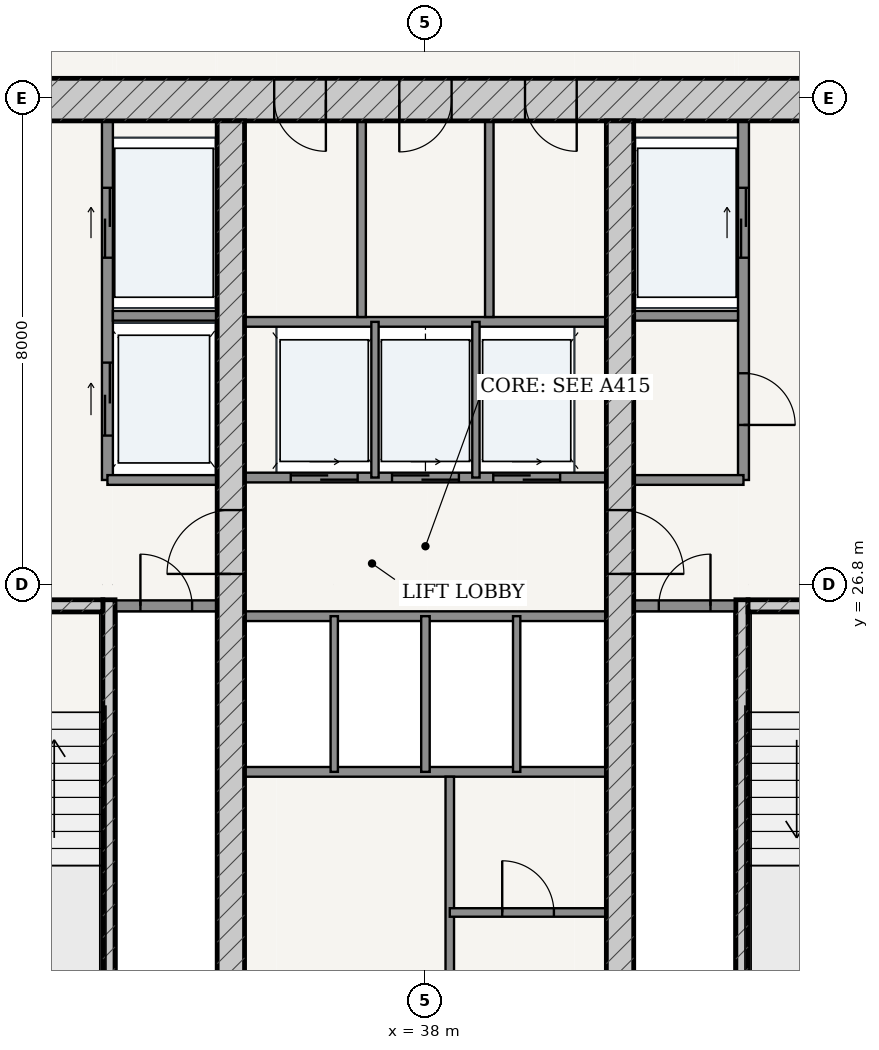
"""IFC4 building model, lengths in metres.
Left out: names, types, materials, properties, quantities, classifications, styles, units other than length and angle.
Written with IfcOpenShell. Run it as: python <this file> out.ifc"""

import sys

from ifc_helpers import new_model, si_unit, direction, frame, frame_2d, origin, place, context, subcontext, project, spatial, rectangle, extrude, source, transform, mapped, element, fill, save


model = new_model("IFC4")
c1 = context("Model", 3, precision=1e-05, world=origin(), true_north=direction((-0.2419218956, 0.970295726276)))
c2 = subcontext(c1, "Body", "Model", "MODEL_VIEW")
j1 = project(units=[si_unit("LENGTHUNIT", "METRE"), si_unit("PLANEANGLEUNIT", "RADIAN")], contexts=[c1])
p1 = place(None, origin())
s1 = spatial("IfcSite", under=j1, at=p1, CompositionType="ELEMENT")
p2 = place(p1, origin())
s2 = spatial("IfcBuilding", under=s1, at=p2, CompositionType="ELEMENT")
p3 = place(p2, frame((0.0, 0.0, 87.0)))
s3 = spatial("IfcBuildingStorey", under=s2, at=p3, CompositionType="ELEMENT", Elevation=87.0)
p4 = place(p3, frame((28.675, 34.775, 0.0), z_axis=(0.0, 0.0, 1.0), x_axis=(1.0, 0.0, 0.0)))
e1 = element("IfcWall", 1, at=p4, inside=s3, PredefinedType="SHEAR", context=c2, shape_type="SweptSolid", body=[
    extrude(rectangle(XDim=18.65, YDim=0.7, at=frame_2d((9.325, 0.0))), origin(), (0.0, 0.0, 1.0), 3.325),
])
p5 = place(p4, frame((6.837, 0.0, 0.0)))
e2 = element("IfcOpeningElement", 2, at=p5, cuts=e1, PredefinedType="OPENING", context=c2, shape_type="SweptSolid", body=[
    extrude(rectangle(XDim=0.85, YDim=2.1, at=frame_2d((0.425, 1.05))), frame((0.0, 0.36, 0.0), z_axis=(0.0, -1.0, 0.0), x_axis=(1.0, 0.0, 0.0)), (0.0, 0.0, 1.0), 0.72),
])
p6 = place(p4, frame((8.895, 0.0, 0.0)))
e3 = element("IfcOpeningElement", 3, at=p6, cuts=e1, PredefinedType="OPENING", context=c2, shape_type="SweptSolid", body=[
    extrude(rectangle(XDim=0.86, YDim=2.1, at=frame_2d((0.43, 1.05))), frame((0.0, 0.36, 0.0), z_axis=(0.0, -1.0, 0.0), x_axis=(1.0, 0.0, 0.0)), (0.0, 0.0, 1.0), 0.72),
])
p7 = place(p4, frame((10.962, 0.0, 0.0)))
e4 = element("IfcOpeningElement", 4, at=p7, cuts=e1, PredefinedType="OPENING", context=c2, shape_type="SweptSolid", body=[
    extrude(rectangle(XDim=0.85, YDim=2.1, at=frame_2d((0.425, 1.05))), frame((0.0, 0.36, 0.0), z_axis=(0.0, -1.0, 0.0), x_axis=(1.0, 0.0, 0.0)), (0.0, 0.0, 1.0), 0.72),
])
p8 = place(p3, frame((32.795, 19.175, 0.0), z_axis=(0.0, 0.0, 1.0), x_axis=(0.0, 1.0, 0.0)))
e5 = element("IfcWall", 5, at=p8, inside=s3, PredefinedType="SOLIDWALL", context=c2, shape_type="SweptSolid", body=[
    extrude(rectangle(XDim=7.375, YDim=0.2, at=frame_2d((3.688, 0.0))), origin(), (0.0, 0.0, 1.0), 3.325),
])
p9 = place(p3, frame((29.375, 26.45, 0.0), z_axis=(0.0, 0.0, 1.0), x_axis=(1.0, 0.0, 0.0)))
e6 = element("IfcWall", 6, at=p9, inside=s3, PredefinedType="SOLIDWALL", context=c2, shape_type="SweptSolid", body=[
    extrude(rectangle(XDim=3.32, YDim=0.2, at=frame_2d((1.66, 0.0))), origin(), (0.0, 0.0, 1.0), 3.325),
])
p10 = place(p9, frame((1.185, 0.0, 0.0)))
e7 = element("IfcOpeningElement", 7, at=p10, cuts=e6, PredefinedType="OPENING", context=c2, shape_type="SweptSolid", body=[
    extrude(rectangle(XDim=0.95, YDim=2.15, at=frame_2d((0.475, 1.075))), frame((0.0, 0.11, 0.0), z_axis=(0.0, -1.0, 0.0), x_axis=(1.0, 0.0, 0.0)), (0.0, 0.0, 1.0), 0.22),
])
p11 = place(p3, frame((43.205, 19.175, 0.0), z_axis=(0.0, 0.0, 1.0), x_axis=(0.0, 1.0, 0.0)))
e8 = element("IfcWall", 8, at=p11, inside=s3, PredefinedType="SOLIDWALL", context=c2, shape_type="SweptSolid", body=[
    extrude(rectangle(XDim=7.375, YDim=0.2, at=frame_2d((3.688, 0.0))), origin(), (0.0, 0.0, 1.0), 3.325),
])
p12 = place(p3, frame((43.305, 26.45, 0.0), z_axis=(0.0, 0.0, 1.0), x_axis=(1.0, 0.0, 0.0)))
e9 = element("IfcWall", 9, at=p12, inside=s3, PredefinedType="SOLIDWALL", context=c2, shape_type="SweptSolid", body=[
    extrude(rectangle(XDim=3.32, YDim=0.2, at=frame_2d((1.66, 0.0))), origin(), (0.0, 0.0, 1.0), 3.325),
])
p13 = place(p12, frame((1.185, 0.0, 0.0)))
e10 = element("IfcOpeningElement", 10, at=p13, cuts=e9, PredefinedType="OPENING", context=c2, shape_type="SweptSolid", body=[
    extrude(rectangle(XDim=0.95, YDim=2.15, at=frame_2d((0.475, 1.075))), frame((0.0, 0.11, 0.0), z_axis=(0.0, -1.0, 0.0), x_axis=(1.0, 0.0, 0.0)), (0.0, 0.0, 1.0), 0.22),
])
p14 = place(p3, frame((34.8, 19.175, 0.0), z_axis=(0.0, 0.0, 1.0), x_axis=(0.0, 1.0, 0.0)))
e11 = element("IfcWall", 11, at=p14, inside=s3, PredefinedType="SHEAR", context=c2, shape_type="SweptSolid", body=[
    extrude(rectangle(XDim=15.25, YDim=0.45, at=frame_2d((7.625, 0.0))), origin(), (0.0, 0.0, 1.0), 3.325),
])
p15 = place(p14, frame((7.8, 0.0, 0.0)))
e12 = element("IfcOpeningElement", 12, at=p15, cuts=e11, PredefinedType="OPENING", context=c2, shape_type="SweptSolid", body=[
    extrude(rectangle(XDim=1.05, YDim=2.15, at=frame_2d((0.525, 1.075))), frame((0.0, 0.235, 0.0), z_axis=(0.0, -1.0, 0.0), x_axis=(1.0, 0.0, 0.0)), (0.0, 0.0, 1.0), 0.47),
])
p16 = place(p3, frame((41.2, 19.175, 0.0), z_axis=(0.0, 0.0, 1.0), x_axis=(0.0, 1.0, 0.0)))
e13 = element("IfcWall", 13, at=p16, inside=s3, PredefinedType="SHEAR", context=c2, shape_type="SweptSolid", body=[
    extrude(rectangle(XDim=15.25, YDim=0.45, at=frame_2d((7.625, 0.0))), origin(), (0.0, 0.0, 1.0), 3.325),
])
p17 = place(p16, frame((7.8, 0.0, 0.0)))
e14 = element("IfcOpeningElement", 14, at=p17, cuts=e13, PredefinedType="OPENING", context=c2, shape_type="SweptSolid", body=[
    extrude(rectangle(XDim=1.05, YDim=2.15, at=frame_2d((0.525, 1.075))), frame((0.0, 0.235, 0.0), z_axis=(0.0, -1.0, 0.0), x_axis=(1.0, 0.0, 0.0)), (0.0, 0.0, 1.0), 0.47),
])
p18 = place(p3, frame((32.9, 26.45, 0.0), z_axis=(0.0, 0.0, 1.0), x_axis=(1.0, 0.0, 0.0)))
e15 = element("IfcWall", 15, at=p18, inside=s3, PredefinedType="PARTITIONING", context=c2, shape_type="SweptSolid", body=[
    extrude(rectangle(XDim=1.675, YDim=0.18, at=frame_2d((0.837, 0.0))), origin(), (0.0, 0.0, 1.0), 3.325),
])
p19 = place(p18, frame((0.413, 0.0, 0.0)))
e16 = element("IfcOpeningElement", 16, at=p19, cuts=e15, PredefinedType="OPENING", context=c2, shape_type="SweptSolid", body=[
    extrude(rectangle(XDim=0.85, YDim=2.1, at=frame_2d((0.425, 1.05))), frame((0.0, 0.1, 0.0), z_axis=(0.0, -1.0, 0.0), x_axis=(1.0, 0.0, 0.0)), (0.0, 0.0, 1.0), 0.2),
])
p20 = place(p3, frame((41.425, 26.45, 0.0), z_axis=(0.0, 0.0, 1.0), x_axis=(1.0, 0.0, 0.0)))
e17 = element("IfcWall", 17, at=p20, inside=s3, PredefinedType="PARTITIONING", context=c2, shape_type="SweptSolid", body=[
    extrude(rectangle(XDim=1.675, YDim=0.18, at=frame_2d((0.837, 0.0))), origin(), (0.0, 0.0, 1.0), 3.325),
])
p21 = place(p20, frame((0.413, 0.0, 0.0)))
e18 = element("IfcOpeningElement", 18, at=p21, cuts=e17, PredefinedType="OPENING", context=c2, shape_type="SweptSolid", body=[
    extrude(rectangle(XDim=0.85, YDim=2.1, at=frame_2d((0.425, 1.05))), frame((0.0, 0.1, 0.0), z_axis=(0.0, -1.0, 0.0), x_axis=(1.0, 0.0, 0.0)), (0.0, 0.0, 1.0), 0.2),
])
p22 = place(p3, frame((32.77, 28.52, 0.0), z_axis=(0.0, 0.0, 1.0), x_axis=(0.0, 1.0, 0.0)))
e19 = element("IfcWall", 19, at=p22, inside=s3, PredefinedType="PARTITIONING", context=c2, shape_type="SweptSolid", body=[
    extrude(rectangle(XDim=5.905, YDim=0.18, at=frame_2d((2.953, 0.0))), origin(), (0.0, 0.0, 1.0), 3.325),
])
p23 = place(p22, frame((3.655, 0.0, 0.0)))
e20 = element("IfcOpeningElement", 20, at=p23, cuts=e19, PredefinedType="OPENING", context=c2, shape_type="SweptSolid", body=[
    extrude(rectangle(XDim=1.15, YDim=2.2, at=frame_2d((0.575, 1.1))), frame((0.0, 0.1, 0.0), z_axis=(0.0, -1.0, 0.0), x_axis=(1.0, 0.0, 0.0)), (0.0, 0.0, 1.0), 0.2),
])
p24 = place(p22, frame((0.73, 0.0, 0.0)))
e21 = element("IfcOpeningElement", 21, at=p24, cuts=e19, PredefinedType="OPENING", context=c2, shape_type="SweptSolid", body=[
    extrude(rectangle(XDim=1.2, YDim=2.25, at=frame_2d((0.6, 1.125))), frame((0.0, 0.1, 0.0), z_axis=(0.0, -1.0, 0.0), x_axis=(1.0, 0.0, 0.0)), (0.0, 0.0, 1.0), 0.2),
])
p25 = place(p3, frame((32.86, 31.22, 0.0), z_axis=(0.0, 0.0, 1.0), x_axis=(1.0, 0.0, 0.0)))
e22 = element("IfcWall", 22, at=p25, inside=s3, PredefinedType="PARTITIONING", context=c2, shape_type="SweptSolid", body=[
    extrude(rectangle(XDim=1.715, YDim=0.16, at=frame_2d((0.857, 0.0))), origin(), (0.0, 0.0, 1.0), 3.325),
])
p26 = place(p3, frame((32.77, 28.52, 0.0), z_axis=(0.0, 0.0, 1.0), x_axis=(1.0, 0.0, 0.0)))
e23 = element("IfcWall", 23, at=p26, inside=s3, PredefinedType="PARTITIONING", context=c2, shape_type="SweptSolid", body=[
    extrude(rectangle(XDim=1.805, YDim=0.16, at=frame_2d((0.902, 0.0))), origin(), (0.0, 0.0, 1.0), 3.325),
])
p27 = place(p3, frame((43.23, 28.52, 0.0), z_axis=(0.0, 0.0, 1.0), x_axis=(0.0, 1.0, 0.0)))
e24 = element("IfcWall", 24, at=p27, inside=s3, PredefinedType="PARTITIONING", context=c2, shape_type="SweptSolid", body=[
    extrude(rectangle(XDim=5.905, YDim=0.18, at=frame_2d((2.953, 0.0))), origin(), (0.0, 0.0, 1.0), 3.325),
])
p28 = place(p27, frame((0.905, 0.0, 0.0)))
e25 = element("IfcOpeningElement", 25, at=p28, cuts=e24, PredefinedType="OPENING", context=c2, shape_type="SweptSolid", body=[
    extrude(rectangle(XDim=0.85, YDim=2.1, at=frame_2d((0.425, 1.05))), frame((0.0, 0.1, 0.0), z_axis=(0.0, -1.0, 0.0), x_axis=(1.0, 0.0, 0.0)), (0.0, 0.0, 1.0), 0.2),
])
p29 = place(p27, frame((3.655, 0.0, 0.0)))
e26 = element("IfcOpeningElement", 26, at=p29, cuts=e24, PredefinedType="OPENING", context=c2, shape_type="SweptSolid", body=[
    extrude(rectangle(XDim=1.15, YDim=2.2, at=frame_2d((0.575, 1.1))), frame((0.0, 0.1, 0.0), z_axis=(0.0, -1.0, 0.0), x_axis=(1.0, 0.0, 0.0)), (0.0, 0.0, 1.0), 0.2),
])
p30 = place(p3, frame((41.425, 31.22, 0.0), z_axis=(0.0, 0.0, 1.0), x_axis=(1.0, 0.0, 0.0)))
e27 = element("IfcWall", 27, at=p30, inside=s3, PredefinedType="PARTITIONING", context=c2, shape_type="SweptSolid", body=[
    extrude(rectangle(XDim=1.715, YDim=0.16, at=frame_2d((0.857, 0.0))), origin(), (0.0, 0.0, 1.0), 3.325),
])
p31 = place(p3, frame((41.425, 28.52, 0.0), z_axis=(0.0, 0.0, 1.0), x_axis=(1.0, 0.0, 0.0)))
e28 = element("IfcWall", 28, at=p31, inside=s3, PredefinedType="PARTITIONING", context=c2, shape_type="SweptSolid", body=[
    extrude(rectangle(XDim=1.805, YDim=0.16, at=frame_2d((0.902, 0.0))), origin(), (0.0, 0.0, 1.0), 3.325),
])
p32 = place(p3, frame((35.025, 28.56, 0.0), z_axis=(0.0, 0.0, 1.0), x_axis=(1.0, 0.0, 0.0)))
e29 = element("IfcWall", 29, at=p32, inside=s3, PredefinedType="PARTITIONING", context=c2, shape_type="SweptSolid", body=[
    extrude(rectangle(XDim=5.95, YDim=0.16, at=frame_2d((2.975, 0.0))), origin(), (0.0, 0.0, 1.0), 3.325),
])
p33 = place(p32, frame((0.76, 0.0, 0.0)))
e30 = element("IfcOpeningElement", 30, at=p33, cuts=e29, PredefinedType="OPENING", context=c2, shape_type="SweptSolid", body=[
    extrude(rectangle(XDim=1.1, YDim=2.2, at=frame_2d((0.55, 1.1))), frame((0.0, 0.09, 0.0), z_axis=(0.0, -1.0, 0.0), x_axis=(1.0, 0.0, 0.0)), (0.0, 0.0, 1.0), 0.18),
])
p34 = place(p32, frame((2.425, 0.0, 0.0)))
e31 = element("IfcOpeningElement", 31, at=p34, cuts=e29, PredefinedType="OPENING", context=c2, shape_type="SweptSolid", body=[
    extrude(rectangle(XDim=1.1, YDim=2.2, at=frame_2d((0.55, 1.1))), frame((0.0, 0.09, 0.0), z_axis=(0.0, -1.0, 0.0), x_axis=(1.0, 0.0, 0.0)), (0.0, 0.0, 1.0), 0.18),
])
p35 = place(p32, frame((4.09, 0.0, 0.0)))
e32 = element("IfcOpeningElement", 32, at=p35, cuts=e29, PredefinedType="OPENING", context=c2, shape_type="SweptSolid", body=[
    extrude(rectangle(XDim=1.1, YDim=2.2, at=frame_2d((0.55, 1.1))), frame((0.0, 0.09, 0.0), z_axis=(0.0, -1.0, 0.0), x_axis=(1.0, 0.0, 0.0)), (0.0, 0.0, 1.0), 0.18),
])
p36 = place(p3, frame((35.025, 31.12, 0.0), z_axis=(0.0, 0.0, 1.0), x_axis=(1.0, 0.0, 0.0)))
e33 = element("IfcWall", 33, at=p36, inside=s3, PredefinedType="PARTITIONING", context=c2, shape_type="SweptSolid", body=[
    extrude(rectangle(XDim=5.95, YDim=0.16, at=frame_2d((2.975, 0.0))), origin(), (0.0, 0.0, 1.0), 3.325),
])
for number, where, z_axis, x_axis in (
    (34, (37.17, 28.56, 0.0), (0.0, 0.0, 1.0), (0.0, 1.0, 0.0)),
    (35, (38.83, 28.56, 0.0), (0.0, 0.0, 1.0), (0.0, 1.0, 0.0)),
):
    element("IfcWall", number, at=place(p3, frame(where, z_axis=z_axis, x_axis=x_axis)), inside=s3, PredefinedType="PARTITIONING", context=c2, shape_type="SweptSolid", body=[
        extrude(rectangle(XDim=2.56, YDim=0.12, at=frame_2d((1.28, 0.0))), origin(), (0.0, 0.0, 1.0), 3.325),
    ])
for number, where, z_axis, x_axis in (
    (36, (36.95, 31.2, 0.0), (0.0, 0.0, 1.0), (0.0, 1.0, 0.0)),
    (37, (39.05, 31.2, 0.0), (0.0, 0.0, 1.0), (0.0, 1.0, 0.0)),
):
    element("IfcWall", number, at=place(p3, frame(where, z_axis=z_axis, x_axis=x_axis)), inside=s3, PredefinedType="PARTITIONING", context=c2, shape_type="SweptSolid", body=[
        extrude(rectangle(XDim=3.225, YDim=0.14, at=frame_2d((1.613, 0.0))), origin(), (0.0, 0.0, 1.0), 3.325),
    ])
for number, where, z_axis, x_axis in (
    (38, (35.025, 26.28, 0.0), (0.0, 0.0, 1.0), (1.0, 0.0, 0.0)),
    (39, (35.025, 23.72, 0.0), (0.0, 0.0, 1.0), (1.0, 0.0, 0.0)),
):
    element("IfcWall", number, at=place(p3, frame(where, z_axis=z_axis, x_axis=x_axis)), inside=s3, PredefinedType="PARTITIONING", context=c2, shape_type="SweptSolid", body=[
        extrude(rectangle(XDim=5.95, YDim=0.16, at=frame_2d((2.975, 0.0))), origin(), (0.0, 0.0, 1.0), 3.325),
    ])
p37 = place(p3, frame((36.5, 23.72, 0.0), z_axis=(0.0, 0.0, 1.0), x_axis=(0.0, 1.0, 0.0)))
e40 = element("IfcWall", 40, at=p37, inside=s3, PredefinedType="PARTITIONING", context=c2, shape_type="SweptSolid", body=[
    extrude(rectangle(XDim=2.56, YDim=0.12, at=frame_2d((1.28, 0.0))), origin(), (0.0, 0.0, 1.0), 3.325),
])
p38 = place(p3, frame((38.0, 23.72, 0.0), z_axis=(0.0, 0.0, 1.0), x_axis=(0.0, 1.0, 0.0)))
e41 = element("IfcWall", 41, at=p38, inside=s3, PredefinedType="PARTITIONING", context=c2, shape_type="SweptSolid", body=[
    extrude(rectangle(XDim=2.56, YDim=0.14, at=frame_2d((1.28, 0.0))), origin(), (0.0, 0.0, 1.0), 3.325),
])
p39 = place(p3, frame((39.5, 23.72, 0.0), z_axis=(0.0, 0.0, 1.0), x_axis=(0.0, 1.0, 0.0)))
e42 = element("IfcWall", 42, at=p39, inside=s3, PredefinedType="PARTITIONING", context=c2, shape_type="SweptSolid", body=[
    extrude(rectangle(XDim=2.56, YDim=0.12, at=frame_2d((1.28, 0.0))), origin(), (0.0, 0.0, 1.0), 3.325),
])
p40 = place(p3, frame((38.4, 19.175, 0.0), z_axis=(0.0, 0.0, 1.0), x_axis=(0.0, 1.0, 0.0)))
e43 = element("IfcWall", 43, at=p40, inside=s3, PredefinedType="PARTITIONING", context=c2, shape_type="SweptSolid", body=[
    extrude(rectangle(XDim=4.465, YDim=0.14, at=frame_2d((2.232, 0.0))), origin(), (0.0, 0.0, 1.0), 3.325),
])
p41 = place(p3, frame((38.4, 21.407, 0.0), z_axis=(0.0, 0.0, 1.0), x_axis=(1.0, 0.0, 0.0)))
e44 = element("IfcWall", 44, at=p41, inside=s3, PredefinedType="PARTITIONING", context=c2, shape_type="SweptSolid", body=[
    extrude(rectangle(XDim=2.575, YDim=0.14, at=frame_2d((1.288, 0.0))), origin(), (0.0, 0.0, 1.0), 3.325),
])
p42 = place(p41, frame((0.863, 0.0, 0.0)))
e45 = element("IfcOpeningElement", 45, at=p42, cuts=e44, PredefinedType="OPENING", context=c2, shape_type="SweptSolid", body=[
    extrude(rectangle(XDim=0.85, YDim=2.1, at=frame_2d((0.425, 1.05))), frame((0.0, 0.08, 0.0), z_axis=(0.0, -1.0, 0.0), x_axis=(1.0, 0.0, 0.0)), (0.0, 0.0, 1.0), 0.16),
])
m1 = source(origin(), c2, "Body", "SweptSolid", [
    extrude(rectangle(XDim=1.05, YDim=2.15, at=frame_2d((0.525, 1.075))), frame((0.0, 0.025, 0.0), z_axis=(0.0, -1.0, 0.0), x_axis=(1.0, 0.0, 0.0)), (0.0, 0.0, 1.0), 0.05),
])
p43 = place(p15, origin())
e46 = element("IfcDoor", 46, at=p43, inside=s3, OperationType="SINGLE_SWING_LEFT", PredefinedType="DOOR", context=c2, shape_type="MappedRepresentation", body=[
    mapped(m1, transform((0.0, 0.0, 0.0), scale=1.0)),
])
fill(e12, e46)
p44 = place(p17, frame((1.05, 0.0, 0.0), z_axis=(0.0, 0.0, 1.0), x_axis=(-1.0, 0.0, 0.0)))
e47 = element("IfcDoor", 47, at=p44, inside=s3, OperationType="SINGLE_SWING_RIGHT", PredefinedType="DOOR", context=c2, shape_type="MappedRepresentation", body=[
    mapped(m1, transform((0.0, 0.0, 0.0), scale=1.0)),
])
fill(e14, e47)
m2 = source(origin(), c2, "Body", "SweptSolid", [
    extrude(rectangle(XDim=0.85, YDim=2.1, at=frame_2d((0.425, 1.05))), frame((0.0, 0.025, 0.0), z_axis=(0.0, -1.0, 0.0), x_axis=(1.0, 0.0, 0.0)), (0.0, 0.0, 1.0), 0.05),
])
p45 = place(p19, origin())
e48 = element("IfcDoor", 48, at=p45, inside=s3, OperationType="SINGLE_SWING_LEFT", PredefinedType="DOOR", context=c2, shape_type="MappedRepresentation", body=[
    mapped(m2, transform((0.0, 0.0, 0.0), scale=1.0)),
])
fill(e16, e48)
p46 = place(p21, origin())
e49 = element("IfcDoor", 49, at=p46, inside=s3, OperationType="SINGLE_SWING_RIGHT", PredefinedType="DOOR", context=c2, shape_type="MappedRepresentation", body=[
    mapped(m2, transform((0.0, 0.0, 0.0), scale=1.0)),
])
fill(e18, e49)
p47 = place(p28, frame((0.85, 0.0, 0.0), z_axis=(0.0, 0.0, 1.0), x_axis=(-1.0, 0.0, 0.0)))
e50 = element("IfcDoor", 50, at=p47, inside=s3, OperationType="SINGLE_SWING_RIGHT", PredefinedType="DOOR", context=c2, shape_type="MappedRepresentation", body=[
    mapped(m2, transform((0.0, 0.0, 0.0), scale=1.0)),
])
fill(e25, e50)
p48 = place(p5, frame((0.85, 0.0, 0.0), z_axis=(0.0, 0.0, 1.0), x_axis=(-1.0, 0.0, 0.0)))
e51 = element("IfcDoor", 51, at=p48, inside=s3, OperationType="SINGLE_SWING_LEFT", PredefinedType="DOOR", context=c2, shape_type="MappedRepresentation", body=[
    mapped(m2, transform((0.0, 0.0, 0.0), scale=1.0)),
])
fill(e2, e51)
m3 = source(origin(), c2, "Body", "SweptSolid", [
    extrude(rectangle(XDim=0.86, YDim=2.1, at=frame_2d((0.43, 1.05))), frame((0.0, 0.025, 0.0), z_axis=(0.0, -1.0, 0.0), x_axis=(1.0, 0.0, 0.0)), (0.0, 0.0, 1.0), 0.05),
])
p49 = place(p6, frame((0.86, 0.0, 0.0), z_axis=(0.0, 0.0, 1.0), x_axis=(-1.0, 0.0, 0.0)))
e52 = element("IfcDoor", 52, at=p49, inside=s3, OperationType="SINGLE_SWING_RIGHT", PredefinedType="DOOR", context=c2, shape_type="MappedRepresentation", body=[
    mapped(m3, transform((0.0, 0.0, 0.0), scale=1.0)),
])
fill(e3, e52)
p50 = place(p7, frame((0.85, 0.0, 0.0), z_axis=(0.0, 0.0, 1.0), x_axis=(-1.0, 0.0, 0.0)))
e53 = element("IfcDoor", 53, at=p50, inside=s3, OperationType="SINGLE_SWING_LEFT", PredefinedType="DOOR", context=c2, shape_type="MappedRepresentation", body=[
    mapped(m2, transform((0.0, 0.0, 0.0), scale=1.0)),
])
fill(e4, e53)
p51 = place(p42, origin())
e54 = element("IfcDoor", 54, at=p51, inside=s3, OperationType="SINGLE_SWING_LEFT", PredefinedType="DOOR", context=c2, shape_type="MappedRepresentation", body=[
    mapped(m2, transform((0.0, 0.0, 0.0), scale=1.0)),
])
fill(e45, e54)
m4 = source(origin(), c2, "Body", "SweptSolid", [
    extrude(rectangle(XDim=1.15, YDim=2.2, at=frame_2d((0.575, 1.1))), frame((0.0, 0.025, 0.0), z_axis=(0.0, -1.0, 0.0), x_axis=(1.0, 0.0, 0.0)), (0.0, 0.0, 1.0), 0.05),
])
p52 = place(p23, origin())
e55 = element("IfcDoor", 55, at=p52, inside=s3, OperationType="DOUBLE_DOOR_SLIDING", PredefinedType="DOOR", context=c2, shape_type="MappedRepresentation", body=[
    mapped(m4, transform((0.0, 0.0, 0.0), scale=1.0)),
])
fill(e20, e55)
p53 = place(p29, origin())
e56 = element("IfcDoor", 56, at=p53, inside=s3, OperationType="DOUBLE_DOOR_SLIDING", PredefinedType="DOOR", context=c2, shape_type="MappedRepresentation", body=[
    mapped(m4, transform((0.0, 0.0, 0.0), scale=1.0)),
])
fill(e26, e56)
m5 = source(origin(), c2, "Body", "SweptSolid", [
    extrude(rectangle(XDim=1.2, YDim=2.25, at=frame_2d((0.6, 1.125))), frame((0.0, 0.025, 0.0), z_axis=(0.0, -1.0, 0.0), x_axis=(1.0, 0.0, 0.0)), (0.0, 0.0, 1.0), 0.05),
])
p54 = place(p24, origin())
e57 = element("IfcDoor", 57, at=p54, inside=s3, OperationType="DOUBLE_DOOR_SLIDING", PredefinedType="DOOR", context=c2, shape_type="MappedRepresentation", body=[
    mapped(m5, transform((0.0, 0.0, 0.0), scale=1.0)),
])
fill(e21, e57)
m6 = source(origin(), c2, "Body", "SweptSolid", [
    extrude(rectangle(XDim=1.1, YDim=2.2, at=frame_2d((0.55, 1.1))), frame((0.0, 0.025, 0.0), z_axis=(0.0, -1.0, 0.0), x_axis=(1.0, 0.0, 0.0)), (0.0, 0.0, 1.0), 0.05),
])
p55 = place(p33, origin())
e58 = element("IfcDoor", 58, at=p55, inside=s3, OperationType="DOUBLE_DOOR_SLIDING", PredefinedType="DOOR", context=c2, shape_type="MappedRepresentation", body=[
    mapped(m6, transform((0.0, 0.0, 0.0), scale=1.0)),
])
fill(e30, e58)
p56 = place(p34, origin())
e59 = element("IfcDoor", 59, at=p56, inside=s3, OperationType="DOUBLE_DOOR_SLIDING", PredefinedType="DOOR", context=c2, shape_type="MappedRepresentation", body=[
    mapped(m6, transform((0.0, 0.0, 0.0), scale=1.0)),
])
fill(e31, e59)
p57 = place(p35, origin())
e60 = element("IfcDoor", 60, at=p57, inside=s3, OperationType="DOUBLE_DOOR_SLIDING", PredefinedType="DOOR", context=c2, shape_type="MappedRepresentation", body=[
    mapped(m6, transform((0.0, 0.0, 0.0), scale=1.0)),
])
fill(e32, e60)
save(model, sys.argv[1])
